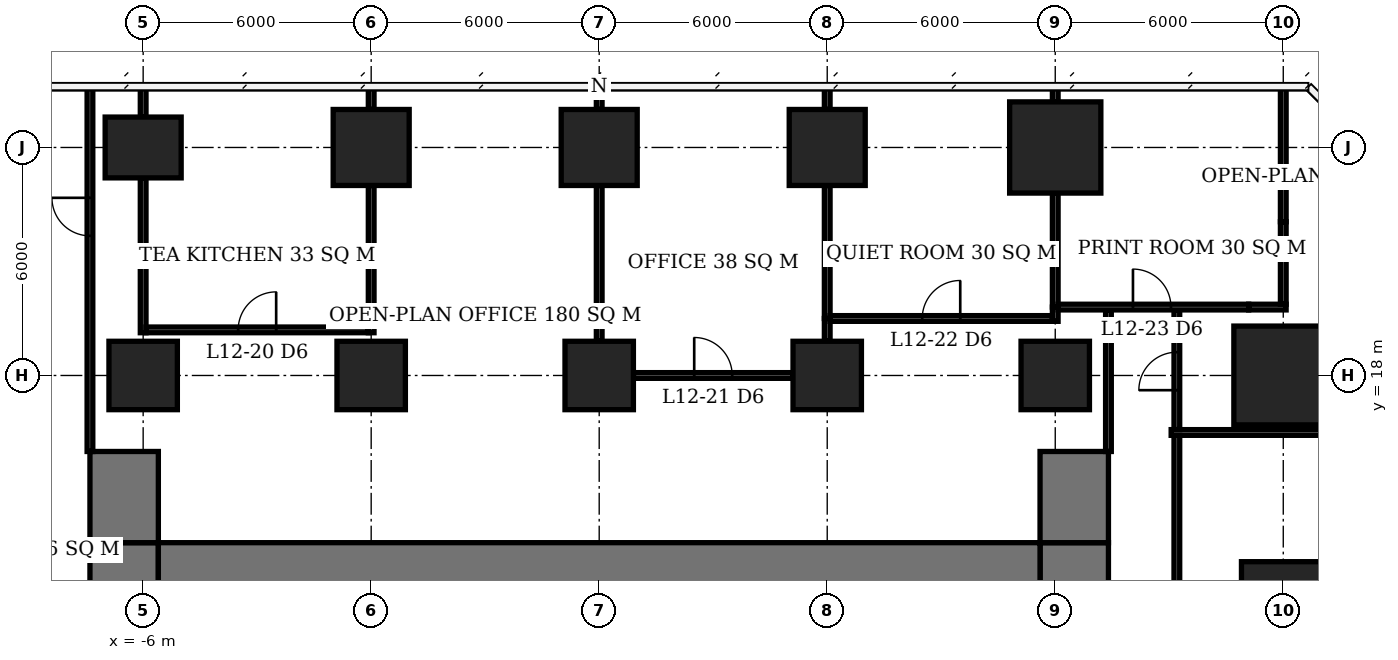
"""IFC4 building model, lengths in metres.
Left out: names, types, materials, properties, quantities, classifications, styles, units other than length and angle.
Written with IfcOpenShell. Run it as: python <this file> out.ifc"""

import sys

from ifc_helpers import new_model, si_unit, direction, frame, frame_2d, origin, origin_2d, place, context, subcontext, project, spatial, rectangle, extrude, element, fill, save


model = new_model("IFC4")
c1 = context("Model", 3, precision=1e-05, world=origin(), true_north=direction((0.0, 1.0)))
c2 = subcontext(c1, "Body", "Model", "MODEL_VIEW")
j1 = project(units=[si_unit("LENGTHUNIT", "METRE"), si_unit("PLANEANGLEUNIT", "RADIAN")], contexts=[c1])
p1 = place(None, origin())
s1 = spatial("IfcSite", under=j1, at=p1, CompositionType="ELEMENT")
p2 = place(p1, origin())
s2 = spatial("IfcBuilding", under=s1, at=p2, CompositionType="ELEMENT")
p3 = place(p2, frame((0.0, 0.0, 53.3)))
s3 = spatial("IfcBuildingStorey", under=s2, at=p3, CompositionType="ELEMENT", Elevation=53.3)
p4 = place(p3, frame((-6.0, 18.0, 0.0), z_axis=(0.0, 0.0, 1.0), x_axis=(1.0, 0.0, 0.0)))
e1 = element("IfcColumn", 1, at=p4, inside=s3, PredefinedType="COLUMN", context=c2, shape_type="SweptSolid", body=[
    extrude(rectangle(XDim=1.8, YDim=1.8, at=origin_2d()), origin(), (0.0, 0.0, 1.0), 3.9),
])
p5 = place(p3, frame((-6.0, 24.0, 0.0), z_axis=(0.0, 0.0, 1.0), x_axis=(1.0, 0.0, 0.0)))
e2 = element("IfcColumn", 2, at=p5, inside=s3, PredefinedType="COLUMN", context=c2, shape_type="SweptSolid", body=[
    extrude(rectangle(XDim=2.0, YDim=1.6, at=origin_2d()), origin(), (0.0, 0.0, 1.0), 3.9),
])
p6 = place(p3, frame((0.0, 18.0, 0.0), z_axis=(0.0, 0.0, 1.0), x_axis=(1.0, 0.0, 0.0)))
e3 = element("IfcColumn", 3, at=p6, inside=s3, PredefinedType="COLUMN", context=c2, shape_type="SweptSolid", body=[
    extrude(rectangle(XDim=1.8, YDim=1.8, at=origin_2d()), origin(), (0.0, 0.0, 1.0), 3.9),
])
p7 = place(p3, frame((0.0, 24.0, 0.0), z_axis=(0.0, 0.0, 1.0), x_axis=(1.0, 0.0, 0.0)))
e4 = element("IfcColumn", 4, at=p7, inside=s3, PredefinedType="COLUMN", context=c2, shape_type="SweptSolid", body=[
    extrude(rectangle(XDim=2.0, YDim=2.0, at=origin_2d()), origin(), (0.0, 0.0, 1.0), 3.9),
])
p8 = place(p3, frame((6.0, 18.0, 0.0), z_axis=(0.0, 0.0, 1.0), x_axis=(1.0, 0.0, 0.0)))
e5 = element("IfcColumn", 5, at=p8, inside=s3, PredefinedType="COLUMN", context=c2, shape_type="SweptSolid", body=[
    extrude(rectangle(XDim=1.8, YDim=1.8, at=origin_2d()), origin(), (0.0, 0.0, 1.0), 3.9),
])
p9 = place(p3, frame((6.0, 24.0, 0.0), z_axis=(0.0, 0.0, 1.0), x_axis=(1.0, 0.0, 0.0)))
e6 = element("IfcColumn", 6, at=p9, inside=s3, PredefinedType="COLUMN", context=c2, shape_type="SweptSolid", body=[
    extrude(rectangle(XDim=2.0, YDim=2.0, at=origin_2d()), origin(), (0.0, 0.0, 1.0), 3.9),
])
p10 = place(p3, frame((12.0, 18.0, 0.0), z_axis=(0.0, 0.0, 1.0), x_axis=(1.0, 0.0, 0.0)))
e7 = element("IfcColumn", 7, at=p10, inside=s3, PredefinedType="COLUMN", context=c2, shape_type="SweptSolid", body=[
    extrude(rectangle(XDim=1.8, YDim=1.8, at=origin_2d()), origin(), (0.0, 0.0, 1.0), 3.9),
])
p11 = place(p3, frame((12.0, 24.0, 0.0), z_axis=(0.0, 0.0, 1.0), x_axis=(1.0, 0.0, 0.0)))
e8 = element("IfcColumn", 8, at=p11, inside=s3, PredefinedType="COLUMN", context=c2, shape_type="SweptSolid", body=[
    extrude(rectangle(XDim=2.0, YDim=2.0, at=origin_2d()), origin(), (0.0, 0.0, 1.0), 3.9),
])
p12 = place(p3, frame((18.0, 18.0, 0.0), z_axis=(0.0, 0.0, 1.0), x_axis=(1.0, 0.0, 0.0)))
e9 = element("IfcColumn", 9, at=p12, inside=s3, PredefinedType="COLUMN", context=c2, shape_type="SweptSolid", body=[
    extrude(rectangle(XDim=1.8, YDim=1.8, at=origin_2d()), origin(), (0.0, 0.0, 1.0), 3.9),
])
p13 = place(p3, frame((18.0, 24.0, 0.0), z_axis=(0.0, 0.0, 1.0), x_axis=(1.0, 0.0, 0.0)))
e10 = element("IfcColumn", 10, at=p13, inside=s3, PredefinedType="COLUMN", context=c2, shape_type="SweptSolid", body=[
    extrude(rectangle(XDim=2.4, YDim=2.4, at=origin_2d()), origin(), (0.0, 0.0, 1.0), 3.9),
])
p14 = place(p3, frame((24.0, 12.0, 0.0), z_axis=(0.0, 0.0, 1.0), x_axis=(1.0, 0.0, 0.0)))
e11 = element("IfcColumn", 11, at=p14, inside=s3, PredefinedType="COLUMN", context=c2, shape_type="SweptSolid", body=[
    extrude(rectangle(XDim=2.2, YDim=2.2, at=origin_2d()), origin(), (0.0, 0.0, 1.0), 3.9),
])
p15 = place(p3, frame((24.0, 18.0, 0.0), z_axis=(0.0, 0.0, 1.0), x_axis=(1.0, 0.0, 0.0)))
e12 = element("IfcColumn", 12, at=p15, inside=s3, PredefinedType="COLUMN", context=c2, shape_type="SweptSolid", body=[
    extrude(rectangle(XDim=2.6, YDim=2.6, at=origin_2d()), origin(), (0.0, 0.0, 1.0), 3.9),
])
p16 = place(p3, frame((-5.6, 12.6, 0.0), z_axis=(0.0, 0.0, 1.0), x_axis=(1.0, 0.0, 0.0)))
e13 = element("IfcWall", 13, at=p16, inside=s3, PredefinedType="SHEAR", context=c2, shape_type="SweptSolid", body=[
    extrude(rectangle(XDim=23.2, YDim=2.0, at=frame_2d((11.6, 0.0))), origin(), (0.0, 0.0, 1.0), 3.9),
])
p17 = place(p3, frame((-6.5, -7.6, 0.0), z_axis=(0.0, 0.0, 1.0), x_axis=(0.0, 1.0, 0.0)))
e14 = element("IfcWall", 14, at=p17, inside=s3, PredefinedType="SHEAR", context=c2, shape_type="SweptSolid", body=[
    extrude(rectangle(XDim=21.2, YDim=1.8, at=frame_2d((10.6, 0.0))), origin(), (0.0, 0.0, 1.0), 3.9),
])
p18 = place(p17, frame((7.8, 0.0, 0.0)))
e15 = element("IfcOpeningElement", 15, at=p18, cuts=e14, PredefinedType="OPENING", context=c2, shape_type="SweptSolid", body=[
    extrude(rectangle(XDim=1.8, YDim=2.4, at=frame_2d((0.9, 1.2))), frame((0.0, 0.91, 0.0), z_axis=(0.0, -1.0, 0.0), x_axis=(1.0, 0.0, 0.0)), (0.0, 0.0, 1.0), 1.82),
])
p19 = place(p3, frame((18.5, -7.6, 0.0), z_axis=(0.0, 0.0, 1.0), x_axis=(0.0, 1.0, 0.0)))
e16 = element("IfcWall", 16, at=p19, inside=s3, PredefinedType="SHEAR", context=c2, shape_type="SweptSolid", body=[
    extrude(rectangle(XDim=21.2, YDim=1.8, at=frame_2d((10.6, 0.0))), origin(), (0.0, 0.0, 1.0), 3.9),
])
p20 = place(p19, frame((9.2, 0.0, 0.0)))
e17 = element("IfcOpeningElement", 17, at=p20, cuts=e16, PredefinedType="OPENING", context=c2, shape_type="SweptSolid", body=[
    extrude(rectangle(XDim=1.8, YDim=2.4, at=frame_2d((0.9, 1.2))), frame((0.0, 0.91, 0.0), z_axis=(0.0, -1.0, 0.0), x_axis=(1.0, 0.0, 0.0)), (0.0, 0.0, 1.0), 1.82),
])
for number, where, z_axis, x_axis in (
    (18, (-6.5, 13.6, 0.0), (0.0, 0.0, 1.0), (0.0, 1.0, 0.0)),
    (19, (18.5, 13.6, 0.0), (0.0, 0.0, 1.0), (0.0, 1.0, 0.0)),
):
    element("IfcWall", number, at=place(p3, frame(where, z_axis=z_axis, x_axis=x_axis)), inside=s3, PredefinedType="SHEAR", context=c2, shape_type="SweptSolid", body=[
        extrude(rectangle(XDim=2.4, YDim=1.8, at=frame_2d((1.2, 0.0))), origin(), (0.0, 0.0, 1.0), 3.9),
    ])
p21 = place(p3, frame((6.9, 18.0, 0.0), z_axis=(0.0, 0.0, 1.0), x_axis=(1.0, 0.0, 0.0)))
e20 = element("IfcWall", 20, at=p21, inside=s3, PredefinedType="PARTITIONING", context=c2, shape_type="SweptSolid", body=[
    extrude(rectangle(XDim=4.2, YDim=0.15, at=frame_2d((2.1, 0.0))), origin(), (0.0, 0.0, 1.0), 3.65),
])
p22 = place(p21, frame((1.6, 0.0, 0.0)))
e21 = element("IfcOpeningElement", 21, at=p22, cuts=e20, PredefinedType="OPENING", context=c2, shape_type="SweptSolid", body=[
    extrude(rectangle(XDim=1.0, YDim=2.1, at=frame_2d((0.5, 1.05))), frame((0.0, 0.085, 0.0), z_axis=(0.0, -1.0, 0.0), x_axis=(1.0, 0.0, 0.0)), (0.0, 0.0, 1.0), 0.17),
])
p23 = place(p3, frame((-5.925, 19.2, 0.0), z_axis=(0.0, 0.0, 1.0), x_axis=(1.0, 0.0, 0.0)))
e22 = element("IfcWall", 22, at=p23, inside=s3, PredefinedType="PARTITIONING", context=c2, shape_type="SweptSolid", body=[
    extrude(rectangle(XDim=5.85, YDim=0.15, at=frame_2d((2.925, 0.0))), origin(), (0.0, 0.0, 1.0), 3.65),
])
p24 = place(p23, frame((2.425, 0.0, 0.0)))
e23 = element("IfcOpeningElement", 23, at=p24, cuts=e22, PredefinedType="OPENING", context=c2, shape_type="SweptSolid", body=[
    extrude(rectangle(XDim=1.0, YDim=2.1, at=frame_2d((0.5, 1.05))), frame((0.0, 0.085, 0.0), z_axis=(0.0, -1.0, 0.0), x_axis=(1.0, 0.0, 0.0)), (0.0, 0.0, 1.0), 0.17),
])
p25 = place(p3, frame((12.075, 19.5, 0.0), z_axis=(0.0, 0.0, 1.0), x_axis=(1.0, 0.0, 0.0)))
e24 = element("IfcWall", 24, at=p25, inside=s3, PredefinedType="PARTITIONING", context=c2, shape_type="SweptSolid", body=[
    extrude(rectangle(XDim=5.85, YDim=0.15, at=frame_2d((2.925, 0.0))), origin(), (0.0, 0.0, 1.0), 3.65),
])
p26 = place(p25, frame((2.425, 0.0, 0.0)))
e25 = element("IfcOpeningElement", 25, at=p26, cuts=e24, PredefinedType="OPENING", context=c2, shape_type="SweptSolid", body=[
    extrude(rectangle(XDim=1.0, YDim=2.1, at=frame_2d((0.5, 1.05))), frame((0.0, 0.085, 0.0), z_axis=(0.0, -1.0, 0.0), x_axis=(1.0, 0.0, 0.0)), (0.0, 0.0, 1.0), 0.17),
])
p27 = place(p3, frame((18.075, 19.8, 0.0), z_axis=(0.0, 0.0, 1.0), x_axis=(1.0, 0.0, 0.0)))
e26 = element("IfcWall", 26, at=p27, inside=s3, PredefinedType="PARTITIONING", context=c2, shape_type="SweptSolid", body=[
    extrude(rectangle(XDim=5.015, YDim=0.15, at=frame_2d((2.508, 0.0))), origin(), (0.0, 0.0, 1.0), 3.65),
])
p28 = place(p27, frame((1.97, 0.0, 0.0)))
e27 = element("IfcOpeningElement", 27, at=p28, cuts=e26, PredefinedType="OPENING", context=c2, shape_type="SweptSolid", body=[
    extrude(rectangle(XDim=1.0, YDim=2.1, at=frame_2d((0.5, 1.05))), frame((0.0, 0.085, 0.0), z_axis=(0.0, -1.0, 0.0), x_axis=(1.0, 0.0, 0.0)), (0.0, 0.0, 1.0), 0.17),
])
p29 = place(p3, frame((23.09, 19.8, 0.0), z_axis=(0.0, 0.0, 1.0), x_axis=(1.0, 0.0, 0.0)))
e28 = element("IfcWall", 28, at=p29, inside=s3, PredefinedType="PARTITIONING", context=c2, shape_type="SweptSolid", body=[
    extrude(rectangle(XDim=0.985, YDim=0.15, at=frame_2d((0.492, 0.0))), origin(), (0.0, 0.0, 1.0), 2.65),
])
p30 = place(p3, frame((-6.0, 19.125, 0.0), z_axis=(0.0, 0.0, 1.0), x_axis=(0.0, 1.0, 0.0)))
e29 = element("IfcWall", 29, at=p30, inside=s3, PredefinedType="PARTITIONING", context=c2, shape_type="SweptSolid", body=[
    extrude(rectangle(XDim=4.075, YDim=0.15, at=frame_2d((2.038, 0.0))), origin(), (0.0, 0.0, 1.0), 3.65),
])
p31 = place(p3, frame((-6.0, 24.8, 0.0), z_axis=(0.0, 0.0, 1.0), x_axis=(0.0, 1.0, 0.0)))
e30 = element("IfcWall", 30, at=p31, inside=s3, PredefinedType="PARTITIONING", context=c2, shape_type="SweptSolid", body=[
    extrude(rectangle(XDim=0.8, YDim=0.15, at=frame_2d((0.4, 0.0))), origin(), (0.0, 0.0, 1.0), 3.65),
])
p32 = place(p3, frame((0.0, 19.125, 0.0), z_axis=(0.0, 0.0, 1.0), x_axis=(0.0, 1.0, 0.0)))
e31 = element("IfcWall", 31, at=p32, inside=s3, PredefinedType="PARTITIONING", context=c2, shape_type="SweptSolid", body=[
    extrude(rectangle(XDim=3.875, YDim=0.15, at=frame_2d((1.938, 0.0))), origin(), (0.0, 0.0, 1.0), 3.65),
])
p33 = place(p3, frame((0.0, 25.0, 0.0), z_axis=(0.0, 0.0, 1.0), x_axis=(0.0, 1.0, 0.0)))
e32 = element("IfcWall", 32, at=p33, inside=s3, PredefinedType="PARTITIONING", context=c2, shape_type="SweptSolid", body=[
    extrude(rectangle(XDim=0.6, YDim=0.15, at=frame_2d((0.3, 0.0))), origin(), (0.0, 0.0, 1.0), 3.65),
])
p34 = place(p3, frame((6.0, 18.9, 0.0), z_axis=(0.0, 0.0, 1.0), x_axis=(0.0, 1.0, 0.0)))
e33 = element("IfcWall", 33, at=p34, inside=s3, PredefinedType="PARTITIONING", context=c2, shape_type="SweptSolid", body=[
    extrude(rectangle(XDim=4.1, YDim=0.15, at=frame_2d((2.05, 0.0))), origin(), (0.0, 0.0, 1.0), 3.65),
])
p35 = place(p3, frame((6.0, 25.0, 0.0), z_axis=(0.0, 0.0, 1.0), x_axis=(0.0, 1.0, 0.0)))
e34 = element("IfcWall", 34, at=p35, inside=s3, PredefinedType="PARTITIONING", context=c2, shape_type="SweptSolid", body=[
    extrude(rectangle(XDim=0.55, YDim=0.15, at=frame_2d((0.275, 0.0))), origin(), (0.0, 0.0, 1.0), 3.65),
])
p36 = place(p3, frame((12.0, 18.9, 0.0), z_axis=(0.0, 0.0, 1.0), x_axis=(0.0, 1.0, 0.0)))
e35 = element("IfcWall", 35, at=p36, inside=s3, PredefinedType="PARTITIONING", context=c2, shape_type="SweptSolid", body=[
    extrude(rectangle(XDim=0.6, YDim=0.15, at=frame_2d((0.3, 0.0))), origin(), (0.0, 0.0, 1.0), 3.65),
])
p37 = place(p3, frame((12.0, 19.5, 0.0), z_axis=(0.0, 0.0, 1.0), x_axis=(0.0, 1.0, 0.0)))
e36 = element("IfcWall", 36, at=p37, inside=s3, PredefinedType="PARTITIONING", context=c2, shape_type="SweptSolid", body=[
    extrude(rectangle(XDim=3.5, YDim=0.15, at=frame_2d((1.75, 0.0))), origin(), (0.0, 0.0, 1.0), 3.65),
])
p38 = place(p3, frame((12.0, 25.0, 0.0), z_axis=(0.0, 0.0, 1.0), x_axis=(0.0, 1.0, 0.0)))
e37 = element("IfcWall", 37, at=p38, inside=s3, PredefinedType="PARTITIONING", context=c2, shape_type="SweptSolid", body=[
    extrude(rectangle(XDim=0.6, YDim=0.15, at=frame_2d((0.3, 0.0))), origin(), (0.0, 0.0, 1.0), 3.65),
])
p39 = place(p3, frame((18.0, 19.425, 0.0), z_axis=(0.0, 0.0, 1.0), x_axis=(0.0, 1.0, 0.0)))
e38 = element("IfcWall", 38, at=p39, inside=s3, PredefinedType="PARTITIONING", context=c2, shape_type="SweptSolid", body=[
    extrude(rectangle(XDim=0.375, YDim=0.15, at=frame_2d((0.188, 0.0))), origin(), (0.0, 0.0, 1.0), 3.65),
])
p40 = place(p3, frame((18.0, 19.8, 0.0), z_axis=(0.0, 0.0, 1.0), x_axis=(0.0, 1.0, 0.0)))
e39 = element("IfcWall", 39, at=p40, inside=s3, PredefinedType="PARTITIONING", context=c2, shape_type="SweptSolid", body=[
    extrude(rectangle(XDim=3.0, YDim=0.15, at=frame_2d((1.5, 0.0))), origin(), (0.0, 0.0, 1.0), 3.65),
])
p41 = place(p3, frame((18.0, 25.2, 0.0), z_axis=(0.0, 0.0, 1.0), x_axis=(0.0, 1.0, 0.0)))
e40 = element("IfcWall", 40, at=p41, inside=s3, PredefinedType="PARTITIONING", context=c2, shape_type="SweptSolid", body=[
    extrude(rectangle(XDim=0.4, YDim=0.15, at=frame_2d((0.2, 0.0))), origin(), (0.0, 0.0, 1.0), 3.65),
])
p42 = place(p3, frame((24.0, 19.875, 0.0), z_axis=(0.0, 0.0, 1.0), x_axis=(0.0, 1.0, 0.0)))
e41 = element("IfcWall", 41, at=p42, inside=s3, PredefinedType="PARTITIONING", context=c2, shape_type="SweptSolid", body=[
    extrude(rectangle(XDim=2.17, YDim=0.15, at=frame_2d((1.085, 0.0))), origin(), (0.0, 0.0, 1.0), 2.65),
])
p43 = place(p3, frame((24.0, 22.045, 0.0), z_axis=(0.0, 0.0, 1.0), x_axis=(0.0, 1.0, 0.0)))
e42 = element("IfcWall", 42, at=p43, inside=s3, PredefinedType="PARTITIONING", context=c2, shape_type="SweptSolid", body=[
    extrude(rectangle(XDim=3.555, YDim=0.15, at=frame_2d((1.778, 0.0))), origin(), (0.0, 0.0, 1.0), 3.65),
])
p44 = place(p3, frame((-7.4, 16.0, 0.0), z_axis=(0.0, 0.0, 1.0), x_axis=(0.0, 1.0, 0.0)))
e43 = element("IfcWall", 43, at=p44, inside=s3, PredefinedType="PARTITIONING", context=c2, shape_type="SweptSolid", body=[
    extrude(rectangle(XDim=9.6, YDim=0.15, at=frame_2d((4.8, 0.0))), origin(), (0.0, 0.0, 1.0), 3.65),
])
p45 = place(p44, frame((5.675, 0.0, 0.0)))
e44 = element("IfcOpeningElement", 44, at=p45, cuts=e43, PredefinedType="OPENING", context=c2, shape_type="SweptSolid", body=[
    extrude(rectangle(XDim=1.0, YDim=2.1, at=frame_2d((0.5, 1.05))), frame((0.0, 0.085, 0.0), z_axis=(0.0, -1.0, 0.0), x_axis=(1.0, 0.0, 0.0)), (0.0, 0.0, 1.0), 0.17),
])
p46 = place(p3, frame((19.4, 16.0, 0.0), z_axis=(0.0, 0.0, 1.0), x_axis=(0.0, 1.0, 0.0)))
e45 = element("IfcWall", 45, at=p46, inside=s3, PredefinedType="PARTITIONING", context=c2, shape_type="SweptSolid", body=[
    extrude(rectangle(XDim=3.725, YDim=0.15, at=frame_2d((1.863, 0.0))), origin(), (0.0, 0.0, 1.0), 3.65),
])
p47 = place(p3, frame((21.2, -1.425, 0.0), z_axis=(0.0, 0.0, 1.0), x_axis=(0.0, 1.0, 0.0)))
e46 = element("IfcWall", 46, at=p47, inside=s3, PredefinedType="PARTITIONING", context=c2, shape_type="SweptSolid", body=[
    extrude(rectangle(XDim=17.85, YDim=0.15, at=frame_2d((8.925, 0.0))), origin(), (0.0, 0.0, 1.0), 3.65),
])
p48 = place(p47, frame((11.125, 0.0, 0.0)))
e47 = element("IfcOpeningElement", 47, at=p48, cuts=e46, PredefinedType="OPENING", context=c2, shape_type="SweptSolid", body=[
    extrude(rectangle(XDim=1.0, YDim=2.1, at=frame_2d((0.5, 1.05))), frame((0.0, 0.085, 0.0), z_axis=(0.0, -1.0, 0.0), x_axis=(1.0, 0.0, 0.0)), (0.0, 0.0, 1.0), 0.17),
])
p49 = place(p3, frame((21.2, 16.575, 0.0), z_axis=(0.0, 0.0, 1.0), x_axis=(0.0, 1.0, 0.0)))
e48 = element("IfcWall", 48, at=p49, inside=s3, PredefinedType="PARTITIONING", context=c2, shape_type="SweptSolid", body=[
    extrude(rectangle(XDim=3.15, YDim=0.15, at=frame_2d((1.575, 0.0))), origin(), (0.0, 0.0, 1.0), 3.65),
])
p50 = place(p49, frame((1.038, 0.0, 0.0)))
e49 = element("IfcOpeningElement", 49, at=p50, cuts=e48, PredefinedType="OPENING", context=c2, shape_type="SweptSolid", body=[
    extrude(rectangle(XDim=1.0, YDim=2.1, at=frame_2d((0.5, 1.05))), frame((0.0, 0.085, 0.0), z_axis=(0.0, -1.0, 0.0), x_axis=(1.0, 0.0, 0.0)), (0.0, 0.0, 1.0), 0.17),
])
p51 = place(p3, frame((21.05, 16.5, 0.0), z_axis=(0.0, 0.0, 1.0), x_axis=(1.0, 0.0, 0.0)))
e50 = element("IfcWall", 50, at=p51, inside=s3, PredefinedType="PARTITIONING", context=c2, shape_type="SweptSolid", body=[
    extrude(rectangle(XDim=6.54, YDim=0.15, at=frame_2d((3.27, 0.0))), origin(), (0.0, 0.0, 1.0), 3.65),
])
p52 = place(p24, origin())
e51 = element("IfcDoor", 51, at=p52, inside=s3, OperationType="SINGLE_SWING_RIGHT", PredefinedType="DOOR", context=c2, shape_type="SweptSolid", body=[
    extrude(rectangle(XDim=1.0, YDim=2.1, at=frame_2d((0.5, 1.05))), frame((0.0, 0.025, 0.0), z_axis=(0.0, -1.0, 0.0), x_axis=(1.0, 0.0, 0.0)), (0.0, 0.0, 1.0), 0.05),
])
fill(e23, e51)
p53 = place(p22, origin())
e52 = element("IfcDoor", 52, at=p53, inside=s3, OperationType="SINGLE_SWING_LEFT", PredefinedType="DOOR", context=c2, shape_type="SweptSolid", body=[
    extrude(rectangle(XDim=1.0, YDim=2.1, at=frame_2d((0.5, 1.05))), frame((0.0, 0.025, 0.0), z_axis=(0.0, -1.0, 0.0), x_axis=(1.0, 0.0, 0.0)), (0.0, 0.0, 1.0), 0.05),
])
fill(e21, e52)
p54 = place(p26, origin())
e53 = element("IfcDoor", 53, at=p54, inside=s3, OperationType="SINGLE_SWING_RIGHT", PredefinedType="DOOR", context=c2, shape_type="SweptSolid", body=[
    extrude(rectangle(XDim=1.0, YDim=2.1, at=frame_2d((0.5, 1.05))), frame((0.0, 0.025, 0.0), z_axis=(0.0, -1.0, 0.0), x_axis=(1.0, 0.0, 0.0)), (0.0, 0.0, 1.0), 0.05),
])
fill(e25, e53)
p55 = place(p28, origin())
e54 = element("IfcDoor", 54, at=p55, inside=s3, OperationType="SINGLE_SWING_LEFT", PredefinedType="DOOR", context=c2, shape_type="SweptSolid", body=[
    extrude(rectangle(XDim=1.0, YDim=2.1, at=frame_2d((0.5, 1.05))), frame((0.0, 0.025, 0.0), z_axis=(0.0, -1.0, 0.0), x_axis=(1.0, 0.0, 0.0)), (0.0, 0.0, 1.0), 0.05),
])
fill(e27, e54)
p56 = place(p45, origin())
e55 = element("IfcDoor", 55, at=p56, inside=s3, OperationType="SINGLE_SWING_RIGHT", PredefinedType="DOOR", context=c2, shape_type="SweptSolid", body=[
    extrude(rectangle(XDim=1.0, YDim=2.1, at=frame_2d((0.5, 1.05))), frame((0.0, 0.025, 0.0), z_axis=(0.0, -1.0, 0.0), x_axis=(1.0, 0.0, 0.0)), (0.0, 0.0, 1.0), 0.05),
])
fill(e44, e55)
p57 = place(p50, origin())
e56 = element("IfcDoor", 56, at=p57, inside=s3, OperationType="SINGLE_SWING_LEFT", PredefinedType="DOOR", context=c2, shape_type="SweptSolid", body=[
    extrude(rectangle(XDim=1.0, YDim=2.1, at=frame_2d((0.5, 1.05))), frame((0.0, 0.025, 0.0), z_axis=(0.0, -1.0, 0.0), x_axis=(1.0, 0.0, 0.0)), (0.0, 0.0, 1.0), 0.05),
])
fill(e49, e56)
save(model, sys.argv[1])
